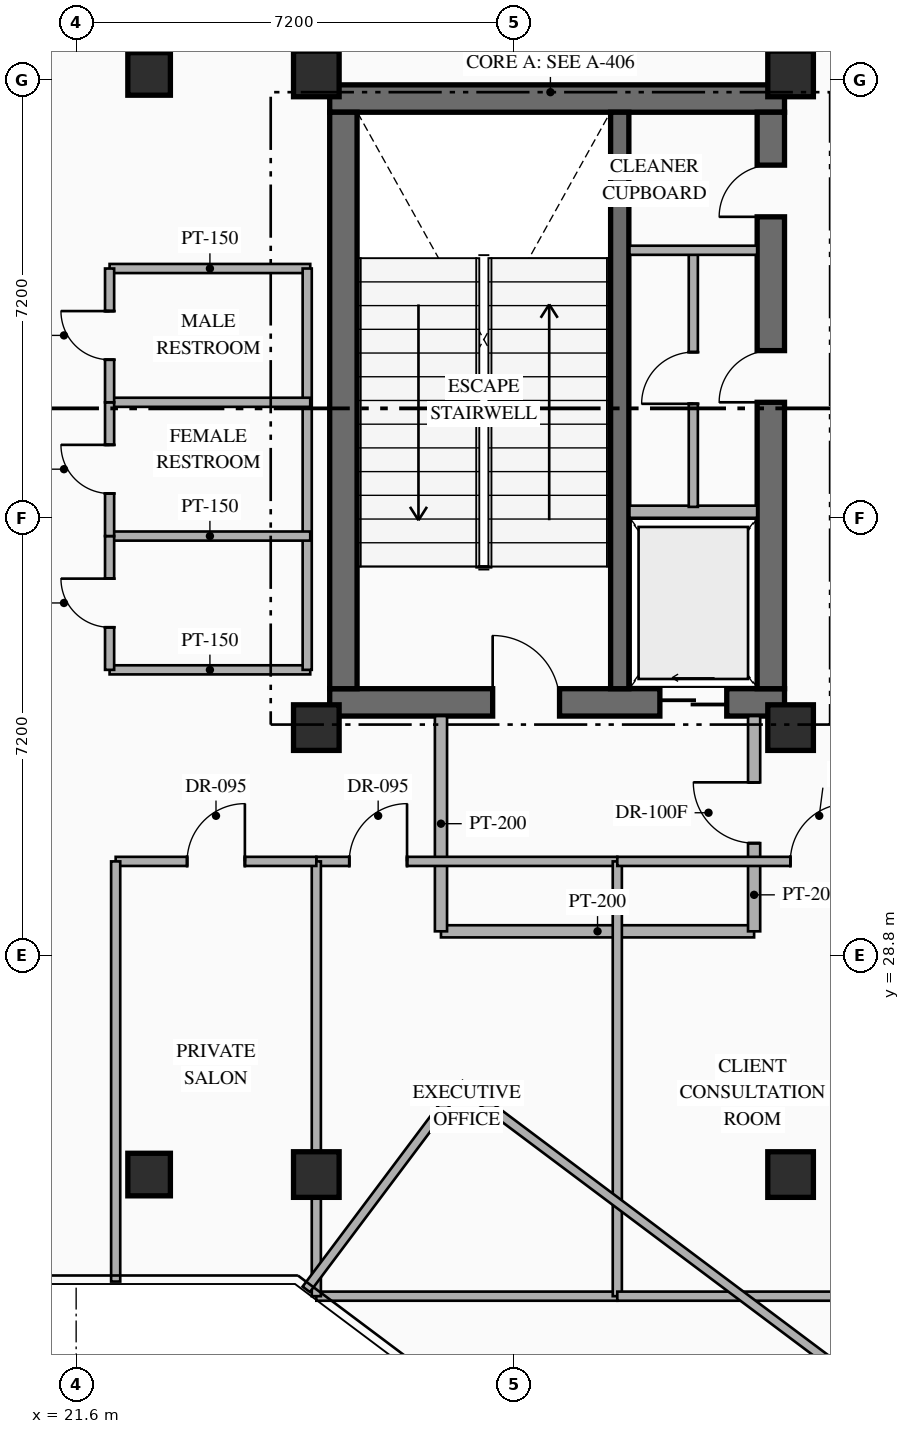
"""IFC4 building model, lengths in metres.
Left out: names, types, materials, properties, quantities, classifications, styles, units other than length and angle.
Written with IfcOpenShell. Run it as: python <this file> out.ifc"""

import sys

from ifc_helpers import new_model, si_unit, direction, frame, frame_2d, origin, origin_2d, place, context, subcontext, project, spatial, rectangle, hollow_rectangle, extrude, element, fill, save


model = new_model("IFC4")
c1 = context("Model", 3, precision=1e-05, world=origin(), true_north=direction((0.0, 1.0)))
c2 = subcontext(c1, "Body", "Model", "MODEL_VIEW")
j1 = project(units=[si_unit("LENGTHUNIT", "METRE"), si_unit("PLANEANGLEUNIT", "RADIAN")], contexts=[c1])
p1 = place(None, origin())
s1 = spatial("IfcSite", under=j1, at=p1, CompositionType="ELEMENT")
p2 = place(p1, origin())
s2 = spatial("IfcBuilding", under=s1, at=p2, CompositionType="ELEMENT")
p3 = place(p2, frame((0.0, 0.0, 186.75)))
s3 = spatial("IfcBuildingStorey", under=s2, at=p3, CompositionType="ELEMENT", Elevation=186.75)
p4 = place(p3, frame((25.77, 32.965, 0.0), z_axis=(0.0, 0.0, 1.0), x_axis=(1.0, 0.0, 0.0)))
e1 = element("IfcWall", 1, at=p4, inside=s3, PredefinedType="SHEAR", context=c2, shape_type="SweptSolid", body=[
    extrude(rectangle(XDim=7.48, YDim=0.45, at=frame_2d((3.74, 0.0))), origin(), (0.0, 0.0, 1.0), 4.8),
])
p5 = place(p4, frame((2.68, 0.0, 0.0)))
e2 = element("IfcOpeningElement", 2, at=p5, cuts=e1, PredefinedType="OPENING", context=c2, shape_type="SweptSolid", body=[
    extrude(rectangle(XDim=1.1, YDim=2.2, at=frame_2d((0.55, 1.1))), frame((0.0, 0.235, 0.0), z_axis=(0.0, -1.0, 0.0), x_axis=(1.0, 0.0, 0.0)), (0.0, 0.0, 1.0), 0.47),
])
p6 = place(p4, frame((5.43, 0.0, 0.0)))
e3 = element("IfcOpeningElement", 3, at=p6, cuts=e1, PredefinedType="OPENING", context=c2, shape_type="SweptSolid", body=[
    extrude(rectangle(XDim=1.1, YDim=2.15, at=frame_2d((0.55, 1.075))), frame((0.0, 0.235, 0.0), z_axis=(0.0, -1.0, 0.0), x_axis=(1.0, 0.0, 0.0)), (0.0, 0.0, 1.0), 0.47),
])
p7 = place(p3, frame((25.77, 42.895, 0.0), z_axis=(0.0, 0.0, 1.0), x_axis=(1.0, 0.0, 0.0)))
e4 = element("IfcWall", 4, at=p7, inside=s3, PredefinedType="SHEAR", context=c2, shape_type="SweptSolid", body=[
    extrude(rectangle(XDim=7.48, YDim=0.45, at=frame_2d((3.74, 0.0))), origin(), (0.0, 0.0, 1.0), 4.8),
])
p8 = place(p3, frame((25.995, 33.19, 0.0), z_axis=(0.0, 0.0, 1.0), x_axis=(0.0, 1.0, 0.0)))
e5 = element("IfcWall", 5, at=p8, inside=s3, PredefinedType="SHEAR", context=c2, shape_type="SweptSolid", body=[
    extrude(rectangle(XDim=9.48, YDim=0.45, at=frame_2d((4.74, 0.0))), origin(), (0.0, 0.0, 1.0), 4.8),
])
p9 = place(p3, frame((33.025, 33.19, 0.0), z_axis=(0.0, 0.0, 1.0), x_axis=(0.0, 1.0, 0.0)))
e6 = element("IfcWall", 6, at=p9, inside=s3, PredefinedType="SHEAR", context=c2, shape_type="SweptSolid", body=[
    extrude(rectangle(XDim=9.48, YDim=0.45, at=frame_2d((4.74, 0.0))), origin(), (0.0, 0.0, 1.0), 4.8),
])
p10 = place(p9, frame((4.71, 0.0, 0.0)))
e7 = element("IfcOpeningElement", 7, at=p10, cuts=e6, PredefinedType="OPENING", context=c2, shape_type="SweptSolid", body=[
    extrude(rectangle(XDim=0.85, YDim=2.08, at=frame_2d((0.425, 1.04))), frame((0.0, 0.235, 0.0), z_axis=(0.0, -1.0, 0.0), x_axis=(1.0, 0.0, 0.0)), (0.0, 0.0, 1.0), 0.47),
])
p11 = place(p9, frame((7.76, 0.0, 0.0)))
e8 = element("IfcOpeningElement", 8, at=p11, cuts=e6, PredefinedType="OPENING", context=c2, shape_type="SweptSolid", body=[
    extrude(rectangle(XDim=0.85, YDim=2.08, at=frame_2d((0.425, 1.04))), frame((0.0, 0.235, 0.0), z_axis=(0.0, -1.0, 0.0), x_axis=(1.0, 0.0, 0.0)), (0.0, 0.0, 1.0), 0.47),
])
p12 = place(p3, frame((30.54, 33.19, 0.0), z_axis=(0.0, 0.0, 1.0), x_axis=(0.0, 1.0, 0.0)))
e9 = element("IfcWall", 9, at=p12, inside=s3, PredefinedType="SHEAR", context=c2, shape_type="SweptSolid", body=[
    extrude(rectangle(XDim=9.48, YDim=0.3, at=frame_2d((4.74, 0.0))), origin(), (0.0, 0.0, 1.0), 4.8),
])
for number, where, z_axis, x_axis in (
    (10, (25.55, 32.55, 0.0), (0.0, 0.0, 1.0), (1.0, 0.0, 0.0)),
    (11, (33.35, 32.55, 0.0), (0.0, 0.0, 1.0), (1.0, 0.0, 0.0)),
    (12, (25.55, 43.3, 0.0), (0.0, 0.0, 1.0), (1.0, 0.0, 0.0)),
    (13, (33.35, 43.3, 0.0), (0.0, 0.0, 1.0), (1.0, 0.0, 0.0)),
    (14, (25.55, 25.2, 0.0), (0.0, 0.0, 1.0), (1.0, 0.0, 0.0)),
    (15, (33.35, 25.2, 0.0), (0.0, 0.0, 1.0), (1.0, 0.0, 0.0)),
):
    element("IfcColumn", number, at=place(p3, frame(where, z_axis=z_axis, x_axis=x_axis)), inside=s3, PredefinedType="COLUMN", context=c2, shape_type="SweptSolid", body=[
        extrude(hollow_rectangle(XDim=0.75, YDim=0.75, WallThickness=0.028, at=origin_2d()), origin(), (0.0, 0.0, 1.0), 4.8),
    ])
for number, where, z_axis, x_axis in (
    (16, (22.8, 25.2, 0.0), (0.0, 0.0, 1.0), (1.0, 0.0, 0.0)),
    (17, (22.8, 43.3, 0.0), (0.0, 0.0, 1.0), (1.0, 0.0, 0.0)),
):
    element("IfcColumn", number, at=place(p3, frame(where, z_axis=z_axis, x_axis=x_axis)), inside=s3, PredefinedType="COLUMN", context=c2, shape_type="SweptSolid", body=[
        extrude(hollow_rectangle(XDim=0.7, YDim=0.7, WallThickness=0.028, at=origin_2d()), origin(), (0.0, 0.0, 1.0), 4.8),
    ])
p13 = place(p3, frame((30.7, 36.1, 0.0), z_axis=(0.0, 0.0, 1.0), x_axis=(1.0, 0.0, 0.0)))
e18 = element("IfcWall", 18, at=p13, inside=s3, PredefinedType="STANDARD", context=c2, shape_type="SweptSolid", body=[
    extrude(rectangle(XDim=2.1, YDim=0.2, at=frame_2d((1.05, 0.0))), origin(), (0.0, 0.0, 1.0), 4.55),
])
p14 = place(p3, frame((31.75, 36.18, 0.0), z_axis=(0.0, 0.0, 1.0), x_axis=(0.0, 1.0, 0.0)))
e19 = element("IfcWall", 19, at=p14, inside=s3, PredefinedType="PARTITIONING", context=c2, shape_type="SweptSolid", body=[
    extrude(rectangle(XDim=4.24, YDim=0.15, at=frame_2d((2.12, 0.0))), origin(), (0.0, 0.0, 1.0), 4.55),
])
p15 = place(p14, frame((1.695, 0.0, 0.0)))
e20 = element("IfcOpeningElement", 20, at=p15, cuts=e19, PredefinedType="OPENING", context=c2, shape_type="SweptSolid", body=[
    extrude(rectangle(XDim=0.85, YDim=2.08, at=frame_2d((0.425, 1.04))), frame((0.0, 0.085, 0.0), z_axis=(0.0, -1.0, 0.0), x_axis=(1.0, 0.0, 0.0)), (0.0, 0.0, 1.0), 0.17),
])
p16 = place(p3, frame((30.7, 40.4, 0.0), z_axis=(0.0, 0.0, 1.0), x_axis=(1.0, 0.0, 0.0)))
e21 = element("IfcWall", 21, at=p16, inside=s3, PredefinedType="PARTITIONING", context=c2, shape_type="SweptSolid", body=[
    extrude(rectangle(XDim=2.1, YDim=0.15, at=frame_2d((1.05, 0.0))), origin(), (0.0, 0.0, 1.0), 4.55),
])
p17 = place(p3, frame((27.6, 29.2, 0.0), z_axis=(0.0, 0.0, 1.0), x_axis=(1.0, 0.0, 0.0)))
e22 = element("IfcWall", 22, at=p17, inside=s3, PredefinedType="STANDARD", context=c2, shape_type="SweptSolid", body=[
    extrude(rectangle(XDim=5.15, YDim=0.2, at=frame_2d((2.575, 0.0))), origin(), (0.0, 0.0, 1.0), 4.55),
])
p18 = place(p3, frame((27.6, 29.2, 0.0), z_axis=(0.0, 0.0, 1.0), x_axis=(0.0, 1.0, 0.0)))
e23 = element("IfcWall", 23, at=p18, inside=s3, PredefinedType="STANDARD", context=c2, shape_type="SweptSolid", body=[
    extrude(rectangle(XDim=3.54, YDim=0.2, at=frame_2d((1.77, 0.0))), origin(), (0.0, 0.0, 1.0), 4.55),
])
p19 = place(p3, frame((32.75, 29.2, 0.0), z_axis=(0.0, 0.0, 1.0), x_axis=(0.0, 1.0, 0.0)))
e24 = element("IfcWall", 24, at=p19, inside=s3, PredefinedType="STANDARD", context=c2, shape_type="SweptSolid", body=[
    extrude(rectangle(XDim=3.54, YDim=0.2, at=frame_2d((1.77, 0.0))), origin(), (0.0, 0.0, 1.0), 4.55),
])
p20 = place(p19, frame((1.45, 0.0, 0.0)))
e25 = element("IfcOpeningElement", 25, at=p20, cuts=e24, PredefinedType="OPENING", context=c2, shape_type="SweptSolid", body=[
    extrude(rectangle(XDim=1.0, YDim=2.2, at=frame_2d((0.5, 1.1))), frame((0.0, 0.11, 0.0), z_axis=(0.0, -1.0, 0.0), x_axis=(1.0, 0.0, 0.0)), (0.0, 0.0, 1.0), 0.22),
])
for number, where, z_axis, x_axis in (
    (26, (22.15, 33.5, 0.0), (0.0, 0.0, 1.0), (1.0, 0.0, 0.0)),
    (27, (22.15, 40.1, 0.0), (0.0, 0.0, 1.0), (1.0, 0.0, 0.0)),
):
    element("IfcWall", number, at=place(p3, frame(where, z_axis=z_axis, x_axis=x_axis)), inside=s3, PredefinedType="PARTITIONING", context=c2, shape_type="SweptSolid", body=[
        extrude(rectangle(XDim=3.3, YDim=0.15, at=frame_2d((1.65, 0.0))), origin(), (0.0, 0.0, 1.0), 4.55),
    ])
p21 = place(p3, frame((25.4, 33.5, 0.0), z_axis=(0.0, 0.0, 1.0), x_axis=(0.0, 1.0, 0.0)))
e28 = element("IfcWall", 28, at=p21, inside=s3, PredefinedType="PARTITIONING", context=c2, shape_type="SweptSolid", body=[
    extrude(rectangle(XDim=6.6, YDim=0.15, at=frame_2d((3.3, 0.0))), origin(), (0.0, 0.0, 1.0), 4.55),
])
for number, where, z_axis, x_axis in (
    (29, (22.15, 35.7, 0.0), (0.0, 0.0, 1.0), (1.0, 0.0, 0.0)),
    (30, (22.15, 37.9, 0.0), (0.0, 0.0, 1.0), (1.0, 0.0, 0.0)),
):
    element("IfcWall", number, at=place(p3, frame(where, z_axis=z_axis, x_axis=x_axis)), inside=s3, PredefinedType="PARTITIONING", context=c2, shape_type="SweptSolid", body=[
        extrude(rectangle(XDim=3.3, YDim=0.15, at=frame_2d((1.65, 0.0))), origin(), (0.0, 0.0, 1.0), 4.55),
    ])
p22 = place(p3, frame((22.15, 33.5, 0.0), z_axis=(0.0, 0.0, 1.0), x_axis=(0.0, 1.0, 0.0)))
e31 = element("IfcWall", 31, at=p22, inside=s3, PredefinedType="PARTITIONING", context=c2, shape_type="SweptSolid", body=[
    extrude(rectangle(XDim=2.2, YDim=0.15, at=frame_2d((1.1, 0.0))), origin(), (0.0, 0.0, 1.0), 4.55),
])
p23 = place(p22, frame((0.7, 0.0, 0.0)))
e32 = element("IfcOpeningElement", 32, at=p23, cuts=e31, PredefinedType="OPENING", context=c2, shape_type="SweptSolid", body=[
    extrude(rectangle(XDim=0.8, YDim=2.06, at=frame_2d((0.4, 1.03))), frame((0.0, 0.085, 0.0), z_axis=(0.0, -1.0, 0.0), x_axis=(1.0, 0.0, 0.0)), (0.0, 0.0, 1.0), 0.17),
])
p24 = place(p3, frame((22.15, 35.7, 0.0), z_axis=(0.0, 0.0, 1.0), x_axis=(0.0, 1.0, 0.0)))
e33 = element("IfcWall", 33, at=p24, inside=s3, PredefinedType="PARTITIONING", context=c2, shape_type="SweptSolid", body=[
    extrude(rectangle(XDim=2.2, YDim=0.15, at=frame_2d((1.1, 0.0))), origin(), (0.0, 0.0, 1.0), 4.55),
])
p25 = place(p24, frame((0.7, 0.0, 0.0)))
e34 = element("IfcOpeningElement", 34, at=p25, cuts=e33, PredefinedType="OPENING", context=c2, shape_type="SweptSolid", body=[
    extrude(rectangle(XDim=0.8, YDim=2.06, at=frame_2d((0.4, 1.03))), frame((0.0, 0.085, 0.0), z_axis=(0.0, -1.0, 0.0), x_axis=(1.0, 0.0, 0.0)), (0.0, 0.0, 1.0), 0.17),
])
p26 = place(p3, frame((22.15, 37.9, 0.0), z_axis=(0.0, 0.0, 1.0), x_axis=(0.0, 1.0, 0.0)))
e35 = element("IfcWall", 35, at=p26, inside=s3, PredefinedType="PARTITIONING", context=c2, shape_type="SweptSolid", body=[
    extrude(rectangle(XDim=2.2, YDim=0.15, at=frame_2d((1.1, 0.0))), origin(), (0.0, 0.0, 1.0), 4.55),
])
p27 = place(p26, frame((0.7, 0.0, 0.0)))
e36 = element("IfcOpeningElement", 36, at=p27, cuts=e35, PredefinedType="OPENING", context=c2, shape_type="SweptSolid", body=[
    extrude(rectangle(XDim=0.8, YDim=2.06, at=frame_2d((0.4, 1.03))), frame((0.0, 0.085, 0.0), z_axis=(0.0, -1.0, 0.0), x_axis=(1.0, 0.0, 0.0)), (0.0, 0.0, 1.0), 0.17),
])
p28 = place(p3, frame((25.55, 23.2, 0.0), z_axis=(0.0, 0.0, 1.0), x_axis=(1.0, 0.0, 0.0)))
e37 = element("IfcWall", 37, at=p28, inside=s3, PredefinedType="PARTITIONING", context=c2, shape_type="SweptSolid", body=[
    extrude(rectangle(XDim=4.95, YDim=0.15, at=frame_2d((2.475, 0.0))), origin(), (0.0, 0.0, 1.0), 4.55),
])
p29 = place(p3, frame((25.55, 30.35, 0.0), z_axis=(0.0, 0.0, 1.0), x_axis=(1.0, 0.0, 0.0)))
e38 = element("IfcWall", 38, at=p29, inside=s3, PredefinedType="PARTITIONING", context=c2, shape_type="SweptSolid", body=[
    extrude(rectangle(XDim=4.95, YDim=0.15, at=frame_2d((2.475, 0.0))), origin(), (0.0, 0.0, 1.0), 4.55),
])
p30 = place(p29, frame((0.542, 0.0, 0.0)))
e39 = element("IfcOpeningElement", 39, at=p30, cuts=e38, PredefinedType="OPENING", context=c2, shape_type="SweptSolid", body=[
    extrude(rectangle(XDim=0.95, YDim=2.15, at=frame_2d((0.475, 1.075))), frame((0.0, 0.085, 0.0), z_axis=(0.0, -1.0, 0.0), x_axis=(1.0, 0.0, 0.0)), (0.0, 0.0, 1.0), 0.17),
])
p31 = place(p3, frame((25.55, 23.2, 0.0), z_axis=(0.0, 0.0, 1.0), x_axis=(0.0, 1.0, 0.0)))
e40 = element("IfcWall", 40, at=p31, inside=s3, PredefinedType="PARTITIONING", context=c2, shape_type="SweptSolid", body=[
    extrude(rectangle(XDim=7.15, YDim=0.15, at=frame_2d((3.575, 0.0))), origin(), (0.0, 0.0, 1.0), 3.745),
])
p32 = place(p3, frame((30.5, 23.2, 0.0), z_axis=(0.0, 0.0, 1.0), x_axis=(0.0, 1.0, 0.0)))
e41 = element("IfcWall", 41, at=p32, inside=s3, PredefinedType="PARTITIONING", context=c2, shape_type="SweptSolid", body=[
    extrude(rectangle(XDim=7.15, YDim=0.15, at=frame_2d((3.575, 0.0))), origin(), (0.0, 0.0, 1.0), 4.55),
])
p33 = place(p3, frame((30.5, 23.2, 0.0), z_axis=(0.0, 0.0, 1.0), x_axis=(1.0, 0.0, 0.0)))
e42 = element("IfcWall", 42, at=p33, inside=s3, PredefinedType="PARTITIONING", context=c2, shape_type="SweptSolid", body=[
    extrude(rectangle(XDim=4.45, YDim=0.15, at=frame_2d((2.225, 0.0))), origin(), (0.0, 0.0, 1.0), 4.55),
])
p34 = place(p3, frame((30.5, 30.35, 0.0), z_axis=(0.0, 0.0, 1.0), x_axis=(1.0, 0.0, 0.0)))
e43 = element("IfcWall", 43, at=p34, inside=s3, PredefinedType="PARTITIONING", context=c2, shape_type="SweptSolid", body=[
    extrude(rectangle(XDim=4.45, YDim=0.15, at=frame_2d((2.225, 0.0))), origin(), (0.0, 0.0, 1.0), 4.55),
])
p35 = place(p34, frame((2.846, 0.0, 0.0)))
e44 = element("IfcOpeningElement", 44, at=p35, cuts=e43, PredefinedType="OPENING", context=c2, shape_type="SweptSolid", body=[
    extrude(rectangle(XDim=0.95, YDim=2.15, at=frame_2d((0.475, 1.075))), frame((0.0, 0.085, 0.0), z_axis=(0.0, -1.0, 0.0), x_axis=(1.0, 0.0, 0.0)), (0.0, 0.0, 1.0), 0.17),
])
p36 = place(p3, frame((22.25, 30.35, 0.0), z_axis=(0.0, 0.0, 1.0), x_axis=(1.0, 0.0, 0.0)))
e45 = element("IfcWall", 45, at=p36, inside=s3, PredefinedType="PARTITIONING", context=c2, shape_type="SweptSolid", body=[
    extrude(rectangle(XDim=3.3, YDim=0.15, at=frame_2d((1.65, 0.0))), origin(), (0.0, 0.0, 1.0), 4.55),
])
p37 = place(p36, frame((1.175, 0.0, 0.0)))
e46 = element("IfcOpeningElement", 46, at=p37, cuts=e45, PredefinedType="OPENING", context=c2, shape_type="SweptSolid", body=[
    extrude(rectangle(XDim=0.95, YDim=2.15, at=frame_2d((0.475, 1.075))), frame((0.0, 0.085, 0.0), z_axis=(0.0, -1.0, 0.0), x_axis=(1.0, 0.0, 0.0)), (0.0, 0.0, 1.0), 0.17),
])
p38 = place(p3, frame((22.25, 23.44, 0.0), z_axis=(0.0, 0.0, 1.0), x_axis=(0.0, 1.0, 0.0)))
e47 = element("IfcWall", 47, at=p38, inside=s3, PredefinedType="PARTITIONING", context=c2, shape_type="SweptSolid", body=[
    extrude(rectangle(XDim=6.91, YDim=0.15, at=frame_2d((3.455, 0.0))), origin(), (0.0, 0.0, 1.0), 4.55),
])
p39 = place(p3, frame((27.91, 26.68, 0.0), z_axis=(0.0, 0.0, 1.0), x_axis=(0.800005938517, -0.599992081896, 0.0)))
e48 = element("IfcWall", 48, at=p39, inside=s3, PredefinedType="PARTITIONING", context=c2, shape_type="SweptSolid", body=[
    extrude(rectangle(XDim=14.8, YDim=0.15, at=frame_2d((7.4, 0.0))), origin(), (0.0, 0.0, 1.0), 4.55),
])
p40 = place(p39, frame((9.281, 0.0, 0.0)))
e49 = element("IfcOpeningElement", 49, at=p40, cuts=e48, PredefinedType="OPENING", context=c2, shape_type="SweptSolid", body=[
    extrude(rectangle(XDim=0.95, YDim=2.15, at=frame_2d((0.475, 1.075))), frame((0.0, 0.085, 0.0), z_axis=(0.0, -1.0, 0.0), x_axis=(1.0, 0.0, 0.0)), (0.0, 0.0, 1.0), 0.17),
])
p41 = place(p3, frame((25.384, 23.312, 0.0), z_axis=(0.0, 0.0, 1.0), x_axis=(0.599990721155, 0.80000695905, 0.0)))
e50 = element("IfcWall", 50, at=p41, inside=s3, PredefinedType="PARTITIONING", context=c2, shape_type="SweptSolid", body=[
    extrude(rectangle(XDim=4.21, YDim=0.15, at=frame_2d((2.105, 0.0))), origin(), (0.0, 0.0, 1.0), 4.55),
])
p42 = place(p5, origin())
e51 = element("IfcDoor", 51, at=p42, inside=s3, OperationType="SINGLE_SWING_LEFT", PredefinedType="DOOR", context=c2, shape_type="SweptSolid", body=[
    extrude(rectangle(XDim=1.1, YDim=2.2, at=frame_2d((0.55, 1.1))), frame((0.0, 0.025, 0.0), z_axis=(0.0, -1.0, 0.0), x_axis=(1.0, 0.0, 0.0)), (0.0, 0.0, 1.0), 0.05),
])
fill(e2, e51)
p43 = place(p6, origin())
e52 = element("IfcDoor", 52, at=p43, inside=s3, OperationType="SLIDING_TO_LEFT", PredefinedType="USERDEFINED", context=c2, shape_type="SweptSolid", body=[
    extrude(rectangle(XDim=1.1, YDim=2.15, at=frame_2d((0.55, 1.075))), frame((0.0, 0.025, 0.0), z_axis=(0.0, -1.0, 0.0), x_axis=(1.0, 0.0, 0.0)), (0.0, 0.0, 1.0), 0.05),
])
fill(e3, e52)
p44 = place(p10, origin())
e53 = element("IfcDoor", 53, at=p44, inside=s3, OperationType="SINGLE_SWING_LEFT", PredefinedType="DOOR", context=c2, shape_type="SweptSolid", body=[
    extrude(rectangle(XDim=0.85, YDim=2.08, at=frame_2d((0.425, 1.04))), frame((0.0, 0.025, 0.0), z_axis=(0.0, -1.0, 0.0), x_axis=(1.0, 0.0, 0.0)), (0.0, 0.0, 1.0), 0.05),
])
fill(e7, e53)
p45 = place(p11, origin())
e54 = element("IfcDoor", 54, at=p45, inside=s3, OperationType="SINGLE_SWING_LEFT", PredefinedType="DOOR", context=c2, shape_type="SweptSolid", body=[
    extrude(rectangle(XDim=0.85, YDim=2.08, at=frame_2d((0.425, 1.04))), frame((0.0, 0.025, 0.0), z_axis=(0.0, -1.0, 0.0), x_axis=(1.0, 0.0, 0.0)), (0.0, 0.0, 1.0), 0.05),
])
fill(e8, e54)
p46 = place(p15, origin())
e55 = element("IfcDoor", 55, at=p46, inside=s3, OperationType="SINGLE_SWING_LEFT", PredefinedType="DOOR", context=c2, shape_type="SweptSolid", body=[
    extrude(rectangle(XDim=0.85, YDim=2.08, at=frame_2d((0.425, 1.04))), frame((0.0, 0.025, 0.0), z_axis=(0.0, -1.0, 0.0), x_axis=(1.0, 0.0, 0.0)), (0.0, 0.0, 1.0), 0.05),
])
fill(e20, e55)
p47 = place(p20, origin())
e56 = element("IfcDoor", 56, at=p47, inside=s3, OperationType="SINGLE_SWING_RIGHT", PredefinedType="DOOR", context=c2, shape_type="SweptSolid", body=[
    extrude(rectangle(XDim=1.0, YDim=2.2, at=frame_2d((0.5, 1.1))), frame((0.0, 0.025, 0.0), z_axis=(0.0, -1.0, 0.0), x_axis=(1.0, 0.0, 0.0)), (0.0, 0.0, 1.0), 0.05),
])
fill(e25, e56)
p48 = place(p23, origin())
e57 = element("IfcDoor", 57, at=p48, inside=s3, OperationType="SINGLE_SWING_RIGHT", PredefinedType="DOOR", context=c2, shape_type="SweptSolid", body=[
    extrude(rectangle(XDim=0.8, YDim=2.06, at=frame_2d((0.4, 1.03))), frame((0.0, 0.025, 0.0), z_axis=(0.0, -1.0, 0.0), x_axis=(1.0, 0.0, 0.0)), (0.0, 0.0, 1.0), 0.05),
])
fill(e32, e57)
p49 = place(p25, origin())
e58 = element("IfcDoor", 58, at=p49, inside=s3, OperationType="SINGLE_SWING_RIGHT", PredefinedType="DOOR", context=c2, shape_type="SweptSolid", body=[
    extrude(rectangle(XDim=0.8, YDim=2.06, at=frame_2d((0.4, 1.03))), frame((0.0, 0.025, 0.0), z_axis=(0.0, -1.0, 0.0), x_axis=(1.0, 0.0, 0.0)), (0.0, 0.0, 1.0), 0.05),
])
fill(e34, e58)
p50 = place(p27, origin())
e59 = element("IfcDoor", 59, at=p50, inside=s3, OperationType="SINGLE_SWING_RIGHT", PredefinedType="DOOR", context=c2, shape_type="SweptSolid", body=[
    extrude(rectangle(XDim=0.8, YDim=2.06, at=frame_2d((0.4, 1.03))), frame((0.0, 0.025, 0.0), z_axis=(0.0, -1.0, 0.0), x_axis=(1.0, 0.0, 0.0)), (0.0, 0.0, 1.0), 0.05),
])
fill(e36, e59)
p51 = place(p30, origin())
e60 = element("IfcDoor", 60, at=p51, inside=s3, OperationType="SINGLE_SWING_RIGHT", PredefinedType="DOOR", context=c2, shape_type="SweptSolid", body=[
    extrude(rectangle(XDim=0.95, YDim=2.15, at=frame_2d((0.475, 1.075))), frame((0.0, 0.025, 0.0), z_axis=(0.0, -1.0, 0.0), x_axis=(1.0, 0.0, 0.0)), (0.0, 0.0, 1.0), 0.05),
])
fill(e39, e60)
p52 = place(p35, origin())
e61 = element("IfcDoor", 61, at=p52, inside=s3, OperationType="SINGLE_SWING_RIGHT", PredefinedType="DOOR", context=c2, shape_type="SweptSolid", body=[
    extrude(rectangle(XDim=0.95, YDim=2.15, at=frame_2d((0.475, 1.075))), frame((0.0, 0.025, 0.0), z_axis=(0.0, -1.0, 0.0), x_axis=(1.0, 0.0, 0.0)), (0.0, 0.0, 1.0), 0.05),
])
fill(e44, e61)
p53 = place(p37, origin())
e62 = element("IfcDoor", 62, at=p53, inside=s3, OperationType="SINGLE_SWING_RIGHT", PredefinedType="DOOR", context=c2, shape_type="SweptSolid", body=[
    extrude(rectangle(XDim=0.95, YDim=2.15, at=frame_2d((0.475, 1.075))), frame((0.0, 0.025, 0.0), z_axis=(0.0, -1.0, 0.0), x_axis=(1.0, 0.0, 0.0)), (0.0, 0.0, 1.0), 0.05),
])
fill(e46, e62)
save(model, sys.argv[1])
